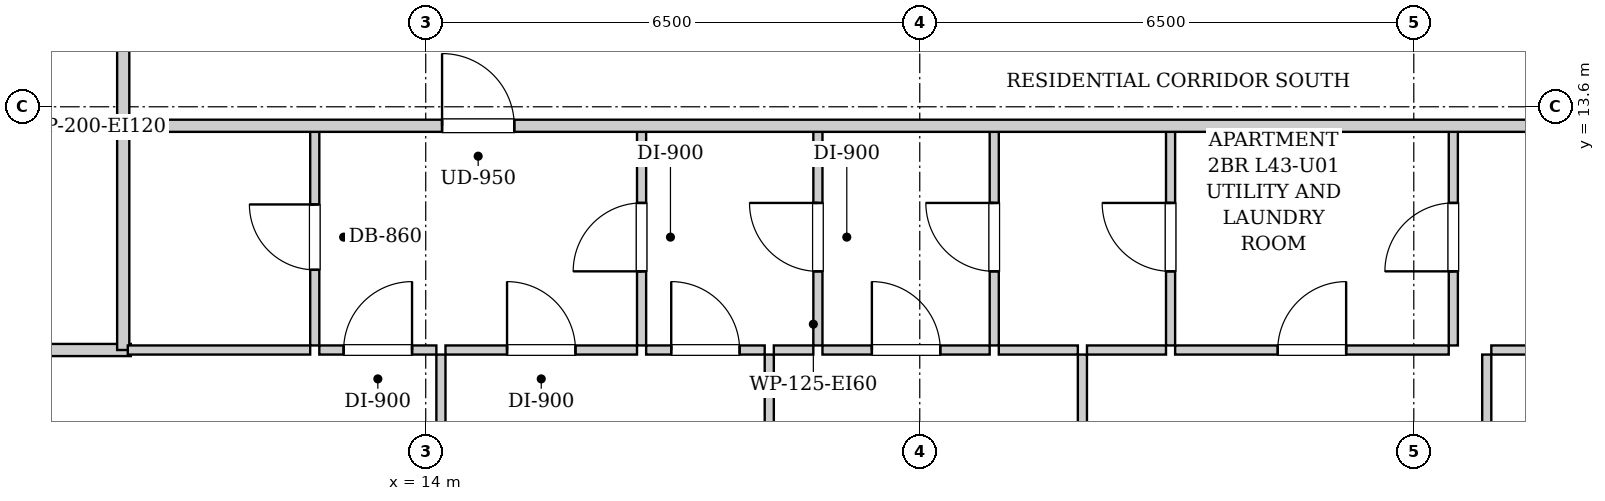
"""IFC4 building model, lengths in metres.
Left out: names, types, materials, properties, quantities, classifications, styles, units other than length and angle.
Written with IfcOpenShell. Run it as: python <this file> out.ifc"""

import sys

from ifc_helpers import new_model, si_unit, direction, frame, frame_2d, origin, place, context, subcontext, project, spatial, rectangle, extrude, element, fill, save


model = new_model("IFC4")
c1 = context("Model", 3, precision=1e-05, world=origin(), true_north=direction((0.0, 1.0)))
c2 = subcontext(c1, "Body", "Model", "MODEL_VIEW")
j1 = project(units=[si_unit("LENGTHUNIT", "METRE"), si_unit("PLANEANGLEUNIT", "RADIAN")], contexts=[c1])
p1 = place(None, origin())
s1 = spatial("IfcSite", under=j1, at=p1, CompositionType="ELEMENT")
p2 = place(p1, origin())
s2 = spatial("IfcBuilding", under=s1, at=p2, CompositionType="ELEMENT")
p3 = place(p2, frame((0.0, 0.0, 150.4)))
s3 = spatial("IfcBuildingStorey", under=s2, at=p3, CompositionType="ELEMENT", Elevation=150.4)
p4 = place(p3, frame((10.02, 13.35, 0.0), z_axis=(0.0, 0.0, 1.0), x_axis=(0.0, 1.0, 0.0)))
e1 = element("IfcWall", 1, at=p4, inside=s3, PredefinedType="PARTITIONING", context=c2, shape_type="SweptSolid", body=[
    extrude(rectangle(XDim=1.74, YDim=0.16, at=frame_2d((0.87, 0.0))), origin(), (0.0, 0.0, 1.0), 2.99),
])
p5 = place(p3, frame((7.78, 10.4, 0.0), z_axis=(0.0, 0.0, 1.0), x_axis=(1.0, 0.0, 0.0)))
e2 = element("IfcWall", 2, at=p5, inside=s3, PredefinedType="PARTITIONING", context=c2, shape_type="SweptSolid", body=[
    extrude(rectangle(XDim=2.34, YDim=0.16, at=frame_2d((1.17, 0.0))), origin(), (0.0, 0.0, 1.0), 2.99),
])
p6 = place(p3, frame((10.02, 10.4, 0.0), z_axis=(0.0, 0.0, 1.0), x_axis=(0.0, 1.0, 0.0)))
e3 = element("IfcWall", 3, at=p6, inside=s3, PredefinedType="PARTITIONING", context=c2, shape_type="SweptSolid", body=[
    extrude(rectangle(XDim=2.91, YDim=0.16, at=frame_2d((1.455, 0.0))), origin(), (0.0, 0.0, 1.0), 2.99),
])
p7 = place(p3, frame((12.54, 10.46, 0.0), z_axis=(0.0, 0.0, 1.0), x_axis=(0.0, 1.0, 0.0)))
e4 = element("IfcWall", 4, at=p7, inside=s3, PredefinedType="PARTITIONING", context=c2, shape_type="SweptSolid", body=[
    extrude(rectangle(XDim=2.85, YDim=0.12, at=frame_2d((1.425, 0.0))), origin(), (0.0, 0.0, 1.0), 2.99),
])
p8 = place(p7, frame((0.995, 0.0, 0.0)))
e5 = element("IfcOpeningElement", 5, at=p8, cuts=e4, PredefinedType="OPENING", context=c2, shape_type="SweptSolid", body=[
    extrude(rectangle(XDim=0.86, YDim=2.05, at=frame_2d((0.43, 1.025))), frame((0.0, 0.07, 0.0), z_axis=(0.0, -1.0, 0.0), x_axis=(1.0, 0.0, 0.0)), (0.0, 0.0, 1.0), 0.14),
])
p9 = place(p3, frame((10.08, 10.4, 0.0), z_axis=(0.0, 0.0, 1.0), x_axis=(1.0, 0.0, 0.0)))
e6 = element("IfcWall", 6, at=p9, inside=s3, PredefinedType="PARTITIONING", context=c2, shape_type="SweptSolid", body=[
    extrude(rectangle(XDim=2.4, YDim=0.12, at=frame_2d((1.2, 0.0))), origin(), (0.0, 0.0, 1.0), 2.99),
])
p10 = place(p3, frame((16.84, 10.46, 0.0), z_axis=(0.0, 0.0, 1.0), x_axis=(0.0, 1.0, 0.0)))
e7 = element("IfcWall", 7, at=p10, inside=s3, PredefinedType="PARTITIONING", context=c2, shape_type="SweptSolid", body=[
    extrude(rectangle(XDim=2.85, YDim=0.12, at=frame_2d((1.425, 0.0))), origin(), (0.0, 0.0, 1.0), 2.99),
])
p11 = place(p10, frame((0.975, 0.0, 0.0)))
e8 = element("IfcOpeningElement", 8, at=p11, cuts=e7, PredefinedType="OPENING", context=c2, shape_type="SweptSolid", body=[
    extrude(rectangle(XDim=0.9, YDim=2.05, at=frame_2d((0.45, 1.025))), frame((0.0, 0.07, 0.0), z_axis=(0.0, -1.0, 0.0), x_axis=(1.0, 0.0, 0.0)), (0.0, 0.0, 1.0), 0.14),
])
p12 = place(p3, frame((12.6, 10.4, 0.0), z_axis=(0.0, 0.0, 1.0), x_axis=(1.0, 0.0, 0.0)))
e9 = element("IfcWall", 9, at=p12, inside=s3, PredefinedType="PARTITIONING", context=c2, shape_type="SweptSolid", body=[
    extrude(rectangle(XDim=1.54, YDim=0.12, at=frame_2d((0.77, 0.0))), origin(), (0.0, 0.0, 1.0), 2.99),
])
p13 = place(p12, frame((0.32, 0.0, 0.0)))
e10 = element("IfcOpeningElement", 10, at=p13, cuts=e9, PredefinedType="OPENING", context=c2, shape_type="SweptSolid", body=[
    extrude(rectangle(XDim=0.9, YDim=2.05, at=frame_2d((0.45, 1.025))), frame((0.0, 0.07, 0.0), z_axis=(0.0, -1.0, 0.0), x_axis=(1.0, 0.0, 0.0)), (0.0, 0.0, 1.0), 0.14),
])
p14 = place(p3, frame((14.26, 10.4, 0.0), z_axis=(0.0, 0.0, 1.0), x_axis=(1.0, 0.0, 0.0)))
e11 = element("IfcWall", 11, at=p14, inside=s3, PredefinedType="PARTITIONING", context=c2, shape_type="SweptSolid", body=[
    extrude(rectangle(XDim=2.52, YDim=0.12, at=frame_2d((1.26, 0.0))), origin(), (0.0, 0.0, 1.0), 2.99),
])
p15 = place(p14, frame((0.81, 0.0, 0.0)))
e12 = element("IfcOpeningElement", 12, at=p15, cuts=e11, PredefinedType="OPENING", context=c2, shape_type="SweptSolid", body=[
    extrude(rectangle(XDim=0.9, YDim=2.05, at=frame_2d((0.45, 1.025))), frame((0.0, 0.07, 0.0), z_axis=(0.0, -1.0, 0.0), x_axis=(1.0, 0.0, 0.0)), (0.0, 0.0, 1.0), 0.14),
])
p16 = place(p3, frame((19.16, 10.46, 0.0), z_axis=(0.0, 0.0, 1.0), x_axis=(0.0, 1.0, 0.0)))
e13 = element("IfcWall", 13, at=p16, inside=s3, PredefinedType="PARTITIONING", context=c2, shape_type="SweptSolid", body=[
    extrude(rectangle(XDim=2.85, YDim=0.12, at=frame_2d((1.425, 0.0))), origin(), (0.0, 0.0, 1.0), 2.99),
])
p17 = place(p16, frame((0.975, 0.0, 0.0)))
e14 = element("IfcOpeningElement", 14, at=p17, cuts=e13, PredefinedType="OPENING", context=c2, shape_type="SweptSolid", body=[
    extrude(rectangle(XDim=0.9, YDim=2.05, at=frame_2d((0.45, 1.025))), frame((0.0, 0.07, 0.0), z_axis=(0.0, -1.0, 0.0), x_axis=(1.0, 0.0, 0.0)), (0.0, 0.0, 1.0), 0.14),
])
p18 = place(p3, frame((16.9, 10.4, 0.0), z_axis=(0.0, 0.0, 1.0), x_axis=(1.0, 0.0, 0.0)))
e15 = element("IfcWall", 15, at=p18, inside=s3, PredefinedType="PARTITIONING", context=c2, shape_type="SweptSolid", body=[
    extrude(rectangle(XDim=1.56, YDim=0.12, at=frame_2d((0.78, 0.0))), origin(), (0.0, 0.0, 1.0), 2.99),
])
p19 = place(p18, frame((0.33, 0.0, 0.0)))
e16 = element("IfcOpeningElement", 16, at=p19, cuts=e15, PredefinedType="OPENING", context=c2, shape_type="SweptSolid", body=[
    extrude(rectangle(XDim=0.9, YDim=2.05, at=frame_2d((0.45, 1.025))), frame((0.0, 0.07, 0.0), z_axis=(0.0, -1.0, 0.0), x_axis=(1.0, 0.0, 0.0)), (0.0, 0.0, 1.0), 0.14),
])
p20 = place(p3, frame((18.58, 10.4, 0.0), z_axis=(0.0, 0.0, 1.0), x_axis=(1.0, 0.0, 0.0)))
e17 = element("IfcWall", 17, at=p20, inside=s3, PredefinedType="PARTITIONING", context=c2, shape_type="SweptSolid", body=[
    extrude(rectangle(XDim=0.52, YDim=0.12, at=frame_2d((0.26, 0.0))), origin(), (0.0, 0.0, 1.0), 2.99),
])
p21 = place(p3, frame((21.48, 10.46, 0.0), z_axis=(0.0, 0.0, 1.0), x_axis=(0.0, 1.0, 0.0)))
e18 = element("IfcWall", 18, at=p21, inside=s3, PredefinedType="PARTITIONING", context=c2, shape_type="SweptSolid", body=[
    extrude(rectangle(XDim=2.85, YDim=0.12, at=frame_2d((1.425, 0.0))), origin(), (0.0, 0.0, 1.0), 2.99),
])
p22 = place(p21, frame((0.975, 0.0, 0.0)))
e19 = element("IfcOpeningElement", 19, at=p22, cuts=e18, PredefinedType="OPENING", context=c2, shape_type="SweptSolid", body=[
    extrude(rectangle(XDim=0.9, YDim=2.05, at=frame_2d((0.45, 1.025))), frame((0.0, 0.07, 0.0), z_axis=(0.0, -1.0, 0.0), x_axis=(1.0, 0.0, 0.0)), (0.0, 0.0, 1.0), 0.14),
])
p23 = place(p3, frame((19.22, 10.4, 0.0), z_axis=(0.0, 0.0, 1.0), x_axis=(1.0, 0.0, 0.0)))
e20 = element("IfcWall", 20, at=p23, inside=s3, PredefinedType="PARTITIONING", context=c2, shape_type="SweptSolid", body=[
    extrude(rectangle(XDim=2.2, YDim=0.12, at=frame_2d((1.1, 0.0))), origin(), (0.0, 0.0, 1.0), 2.99),
])
p24 = place(p23, frame((0.65, 0.0, 0.0)))
e21 = element("IfcOpeningElement", 21, at=p24, cuts=e20, PredefinedType="OPENING", context=c2, shape_type="SweptSolid", body=[
    extrude(rectangle(XDim=0.9, YDim=2.05, at=frame_2d((0.45, 1.025))), frame((0.0, 0.07, 0.0), z_axis=(0.0, -1.0, 0.0), x_axis=(1.0, 0.0, 0.0)), (0.0, 0.0, 1.0), 0.14),
])
p25 = place(p3, frame((23.8, 10.46, 0.0), z_axis=(0.0, 0.0, 1.0), x_axis=(0.0, 1.0, 0.0)))
e22 = element("IfcWall", 22, at=p25, inside=s3, PredefinedType="PARTITIONING", context=c2, shape_type="SweptSolid", body=[
    extrude(rectangle(XDim=2.85, YDim=0.12, at=frame_2d((1.425, 0.0))), origin(), (0.0, 0.0, 1.0), 2.99),
])
p26 = place(p25, frame((0.975, 0.0, 0.0)))
e23 = element("IfcOpeningElement", 23, at=p26, cuts=e22, PredefinedType="OPENING", context=c2, shape_type="SweptSolid", body=[
    extrude(rectangle(XDim=0.9, YDim=2.05, at=frame_2d((0.45, 1.025))), frame((0.0, 0.07, 0.0), z_axis=(0.0, -1.0, 0.0), x_axis=(1.0, 0.0, 0.0)), (0.0, 0.0, 1.0), 0.14),
])
for number, where, z_axis, x_axis in (
    (24, (21.54, 10.4, 0.0), (0.0, 0.0, 1.0), (1.0, 0.0, 0.0)),
    (25, (22.7, 10.4, 0.0), (0.0, 0.0, 1.0), (1.0, 0.0, 0.0)),
):
    element("IfcWall", number, at=place(p3, frame(where, z_axis=z_axis, x_axis=x_axis)), inside=s3, PredefinedType="PARTITIONING", context=c2, shape_type="SweptSolid", body=[
        extrude(rectangle(XDim=1.04, YDim=0.12, at=frame_2d((0.52, 0.0))), origin(), (0.0, 0.0, 1.0), 2.99),
    ])
p27 = place(p3, frame((27.52, 10.46, 0.0), z_axis=(0.0, 0.0, 1.0), x_axis=(0.0, 1.0, 0.0)))
e26 = element("IfcWall", 26, at=p27, inside=s3, PredefinedType="PARTITIONING", context=c2, shape_type="SweptSolid", body=[
    extrude(rectangle(XDim=2.85, YDim=0.12, at=frame_2d((1.425, 0.0))), origin(), (0.0, 0.0, 1.0), 2.99),
])
p28 = place(p27, frame((0.975, 0.0, 0.0)))
e27 = element("IfcOpeningElement", 27, at=p28, cuts=e26, PredefinedType="OPENING", context=c2, shape_type="SweptSolid", body=[
    extrude(rectangle(XDim=0.9, YDim=2.05, at=frame_2d((0.45, 1.025))), frame((0.0, 0.07, 0.0), z_axis=(0.0, -1.0, 0.0), x_axis=(1.0, 0.0, 0.0)), (0.0, 0.0, 1.0), 0.14),
])
p29 = place(p3, frame((23.86, 10.4, 0.0), z_axis=(0.0, 0.0, 1.0), x_axis=(1.0, 0.0, 0.0)))
e28 = element("IfcWall", 28, at=p29, inside=s3, PredefinedType="PARTITIONING", context=c2, shape_type="SweptSolid", body=[
    extrude(rectangle(XDim=3.6, YDim=0.12, at=frame_2d((1.8, 0.0))), origin(), (0.0, 0.0, 1.0), 2.99),
])
p30 = place(p29, frame((1.35, 0.0, 0.0)))
e29 = element("IfcOpeningElement", 29, at=p30, cuts=e28, PredefinedType="OPENING", context=c2, shape_type="SweptSolid", body=[
    extrude(rectangle(XDim=0.9, YDim=2.05, at=frame_2d((0.45, 1.025))), frame((0.0, 0.07, 0.0), z_axis=(0.0, -1.0, 0.0), x_axis=(1.0, 0.0, 0.0)), (0.0, 0.0, 1.0), 0.14),
])
p31 = place(p3, frame((28.02, 10.4, 0.0), z_axis=(0.0, 0.0, 1.0), x_axis=(1.0, 0.0, 0.0)))
e30 = element("IfcWall", 30, at=p31, inside=s3, PredefinedType="PARTITIONING", context=c2, shape_type="SweptSolid", body=[
    extrude(rectangle(XDim=2.65, YDim=0.12, at=frame_2d((1.325, 0.0))), origin(), (0.0, 0.0, 1.0), 2.99),
])
p32 = place(p31, frame((0.875, 0.0, 0.0)))
e31 = element("IfcOpeningElement", 31, at=p32, cuts=e30, PredefinedType="OPENING", context=c2, shape_type="SweptSolid", body=[
    extrude(rectangle(XDim=0.9, YDim=2.05, at=frame_2d((0.45, 1.025))), frame((0.0, 0.07, 0.0), z_axis=(0.0, -1.0, 0.0), x_axis=(1.0, 0.0, 0.0)), (0.0, 0.0, 1.0), 0.14),
])
p33 = place(p3, frame((14.2, 6.23, 0.0), z_axis=(0.0, 0.0, 1.0), x_axis=(0.0, 1.0, 0.0)))
e32 = element("IfcWall", 32, at=p33, inside=s3, PredefinedType="PARTITIONING", context=c2, shape_type="SweptSolid", body=[
    extrude(rectangle(XDim=4.11, YDim=0.12, at=frame_2d((2.055, 0.0))), origin(), (0.0, 0.0, 1.0), 2.99),
])
p34 = place(p33, frame((1.605, 0.0, 0.0)))
e33 = element("IfcOpeningElement", 33, at=p34, cuts=e32, PredefinedType="OPENING", context=c2, shape_type="SweptSolid", body=[
    extrude(rectangle(XDim=0.9, YDim=2.05, at=frame_2d((0.45, 1.025))), frame((0.0, 0.07, 0.0), z_axis=(0.0, -1.0, 0.0), x_axis=(1.0, 0.0, 0.0)), (0.0, 0.0, 1.0), 0.14),
])
p35 = place(p3, frame((18.52, 4.08, 0.0), z_axis=(0.0, 0.0, 1.0), x_axis=(0.0, 1.0, 0.0)))
e34 = element("IfcWall", 34, at=p35, inside=s3, PredefinedType="PARTITIONING", context=c2, shape_type="SweptSolid", body=[
    extrude(rectangle(XDim=6.26, YDim=0.12, at=frame_2d((3.13, 0.0))), origin(), (0.0, 0.0, 1.0), 2.99),
])
p36 = place(p35, frame((2.665, 0.0, 0.0)))
e35 = element("IfcOpeningElement", 35, at=p36, cuts=e34, PredefinedType="OPENING", context=c2, shape_type="SweptSolid", body=[
    extrude(rectangle(XDim=0.9, YDim=2.05, at=frame_2d((0.45, 1.025))), frame((0.0, 0.07, 0.0), z_axis=(0.0, -1.0, 0.0), x_axis=(1.0, 0.0, 0.0)), (0.0, 0.0, 1.0), 0.14),
])
p37 = place(p3, frame((22.64, 4.08, 0.0), z_axis=(0.0, 0.0, 1.0), x_axis=(0.0, 1.0, 0.0)))
e36 = element("IfcWall", 36, at=p37, inside=s3, PredefinedType="PARTITIONING", context=c2, shape_type="SweptSolid", body=[
    extrude(rectangle(XDim=6.26, YDim=0.12, at=frame_2d((3.13, 0.0))), origin(), (0.0, 0.0, 1.0), 2.99),
])
p38 = place(p37, frame((2.665, 0.0, 0.0)))
e37 = element("IfcOpeningElement", 37, at=p38, cuts=e36, PredefinedType="OPENING", context=c2, shape_type="SweptSolid", body=[
    extrude(rectangle(XDim=0.9, YDim=2.05, at=frame_2d((0.45, 1.025))), frame((0.0, 0.07, 0.0), z_axis=(0.0, -1.0, 0.0), x_axis=(1.0, 0.0, 0.0)), (0.0, 0.0, 1.0), 0.14),
])
p39 = place(p3, frame((27.96, 4.08, 0.0), z_axis=(0.0, 0.0, 1.0), x_axis=(0.0, 1.0, 0.0)))
e38 = element("IfcWall", 38, at=p39, inside=s3, PredefinedType="PARTITIONING", context=c2, shape_type="SweptSolid", body=[
    extrude(rectangle(XDim=6.26, YDim=0.12, at=frame_2d((3.13, 0.0))), origin(), (0.0, 0.0, 1.0), 2.99),
])
p40 = place(p39, frame((2.665, 0.0, 0.0)))
e39 = element("IfcOpeningElement", 39, at=p40, cuts=e38, PredefinedType="OPENING", context=c2, shape_type="SweptSolid", body=[
    extrude(rectangle(XDim=0.9, YDim=2.05, at=frame_2d((0.45, 1.025))), frame((0.0, 0.07, 0.0), z_axis=(0.0, -1.0, 0.0), x_axis=(1.0, 0.0, 0.0)), (0.0, 0.0, 1.0), 0.14),
])
p41 = place(p3, frame((10.05, 13.35, 0.0), z_axis=(0.0, 0.0, 1.0), x_axis=(1.0, 0.0, 0.0)))
e40 = element("IfcWall", 40, at=p41, inside=s3, PredefinedType="PARTITIONING", context=c2, shape_type="SweptSolid", body=[
    extrude(rectangle(XDim=27.7, YDim=0.16, at=frame_2d((13.85, 0.0))), origin(), (0.0, 0.0, 1.0), 2.99),
])
p42 = place(p41, frame((4.165, 0.0, 0.0)))
e41 = element("IfcOpeningElement", 41, at=p42, cuts=e40, PredefinedType="OPENING", context=c2, shape_type="SweptSolid", body=[
    extrude(rectangle(XDim=0.95, YDim=2.1, at=frame_2d((0.475, 1.05))), frame((0.0, 0.09, 0.0), z_axis=(0.0, -1.0, 0.0), x_axis=(1.0, 0.0, 0.0)), (0.0, 0.0, 1.0), 0.18),
])
p43 = place(p8, origin())
e42 = element("IfcDoor", 42, at=p43, inside=s3, OperationType="SINGLE_SWING_RIGHT", PredefinedType="DOOR", context=c2, shape_type="SweptSolid", body=[
    extrude(rectangle(XDim=0.86, YDim=2.05, at=frame_2d((0.43, 1.025))), frame((0.0, 0.025, 0.0), z_axis=(0.0, -1.0, 0.0), x_axis=(1.0, 0.0, 0.0)), (0.0, 0.0, 1.0), 0.05),
])
fill(e5, e42)
p44 = place(p11, origin())
e43 = element("IfcDoor", 43, at=p44, inside=s3, OperationType="SINGLE_SWING_LEFT", PredefinedType="DOOR", context=c2, shape_type="SweptSolid", body=[
    extrude(rectangle(XDim=0.9, YDim=2.05, at=frame_2d((0.45, 1.025))), frame((0.0, 0.025, 0.0), z_axis=(0.0, -1.0, 0.0), x_axis=(1.0, 0.0, 0.0)), (0.0, 0.0, 1.0), 0.05),
])
fill(e8, e43)
p45 = place(p13, origin())
e44 = element("IfcDoor", 44, at=p45, inside=s3, OperationType="SINGLE_SWING_RIGHT", PredefinedType="DOOR", context=c2, shape_type="SweptSolid", body=[
    extrude(rectangle(XDim=0.9, YDim=2.05, at=frame_2d((0.45, 1.025))), frame((0.0, 0.025, 0.0), z_axis=(0.0, -1.0, 0.0), x_axis=(1.0, 0.0, 0.0)), (0.0, 0.0, 1.0), 0.05),
])
fill(e10, e44)
p46 = place(p15, origin())
e45 = element("IfcDoor", 45, at=p46, inside=s3, OperationType="SINGLE_SWING_LEFT", PredefinedType="DOOR", context=c2, shape_type="SweptSolid", body=[
    extrude(rectangle(XDim=0.9, YDim=2.05, at=frame_2d((0.45, 1.025))), frame((0.0, 0.025, 0.0), z_axis=(0.0, -1.0, 0.0), x_axis=(1.0, 0.0, 0.0)), (0.0, 0.0, 1.0), 0.05),
])
fill(e12, e45)
p47 = place(p17, origin())
e46 = element("IfcDoor", 46, at=p47, inside=s3, OperationType="SINGLE_SWING_RIGHT", PredefinedType="DOOR", context=c2, shape_type="SweptSolid", body=[
    extrude(rectangle(XDim=0.9, YDim=2.05, at=frame_2d((0.45, 1.025))), frame((0.0, 0.025, 0.0), z_axis=(0.0, -1.0, 0.0), x_axis=(1.0, 0.0, 0.0)), (0.0, 0.0, 1.0), 0.05),
])
fill(e14, e46)
p48 = place(p19, origin())
e47 = element("IfcDoor", 47, at=p48, inside=s3, OperationType="SINGLE_SWING_LEFT", PredefinedType="DOOR", context=c2, shape_type="SweptSolid", body=[
    extrude(rectangle(XDim=0.9, YDim=2.05, at=frame_2d((0.45, 1.025))), frame((0.0, 0.025, 0.0), z_axis=(0.0, -1.0, 0.0), x_axis=(1.0, 0.0, 0.0)), (0.0, 0.0, 1.0), 0.05),
])
fill(e16, e47)
p49 = place(p22, origin())
e48 = element("IfcDoor", 48, at=p49, inside=s3, OperationType="SINGLE_SWING_RIGHT", PredefinedType="DOOR", context=c2, shape_type="SweptSolid", body=[
    extrude(rectangle(XDim=0.9, YDim=2.05, at=frame_2d((0.45, 1.025))), frame((0.0, 0.025, 0.0), z_axis=(0.0, -1.0, 0.0), x_axis=(1.0, 0.0, 0.0)), (0.0, 0.0, 1.0), 0.05),
])
fill(e19, e48)
p50 = place(p24, origin())
e49 = element("IfcDoor", 49, at=p50, inside=s3, OperationType="SINGLE_SWING_LEFT", PredefinedType="DOOR", context=c2, shape_type="SweptSolid", body=[
    extrude(rectangle(XDim=0.9, YDim=2.05, at=frame_2d((0.45, 1.025))), frame((0.0, 0.025, 0.0), z_axis=(0.0, -1.0, 0.0), x_axis=(1.0, 0.0, 0.0)), (0.0, 0.0, 1.0), 0.05),
])
fill(e21, e49)
p51 = place(p26, origin())
e50 = element("IfcDoor", 50, at=p51, inside=s3, OperationType="SINGLE_SWING_RIGHT", PredefinedType="DOOR", context=c2, shape_type="SweptSolid", body=[
    extrude(rectangle(XDim=0.9, YDim=2.05, at=frame_2d((0.45, 1.025))), frame((0.0, 0.025, 0.0), z_axis=(0.0, -1.0, 0.0), x_axis=(1.0, 0.0, 0.0)), (0.0, 0.0, 1.0), 0.05),
])
fill(e23, e50)
p52 = place(p28, origin())
e51 = element("IfcDoor", 51, at=p52, inside=s3, OperationType="SINGLE_SWING_LEFT", PredefinedType="DOOR", context=c2, shape_type="SweptSolid", body=[
    extrude(rectangle(XDim=0.9, YDim=2.05, at=frame_2d((0.45, 1.025))), frame((0.0, 0.025, 0.0), z_axis=(0.0, -1.0, 0.0), x_axis=(1.0, 0.0, 0.0)), (0.0, 0.0, 1.0), 0.05),
])
fill(e27, e51)
p53 = place(p30, origin())
e52 = element("IfcDoor", 52, at=p53, inside=s3, OperationType="SINGLE_SWING_RIGHT", PredefinedType="DOOR", context=c2, shape_type="SweptSolid", body=[
    extrude(rectangle(XDim=0.9, YDim=2.05, at=frame_2d((0.45, 1.025))), frame((0.0, 0.025, 0.0), z_axis=(0.0, -1.0, 0.0), x_axis=(1.0, 0.0, 0.0)), (0.0, 0.0, 1.0), 0.05),
])
fill(e29, e52)
p54 = place(p42, origin())
e53 = element("IfcDoor", 53, at=p54, inside=s3, OperationType="SINGLE_SWING_LEFT", PredefinedType="DOOR", context=c2, shape_type="SweptSolid", body=[
    extrude(rectangle(XDim=0.95, YDim=2.1, at=frame_2d((0.475, 1.05))), frame((0.0, 0.025, 0.0), z_axis=(0.0, -1.0, 0.0), x_axis=(1.0, 0.0, 0.0)), (0.0, 0.0, 1.0), 0.05),
])
fill(e41, e53)
save(model, sys.argv[1])
